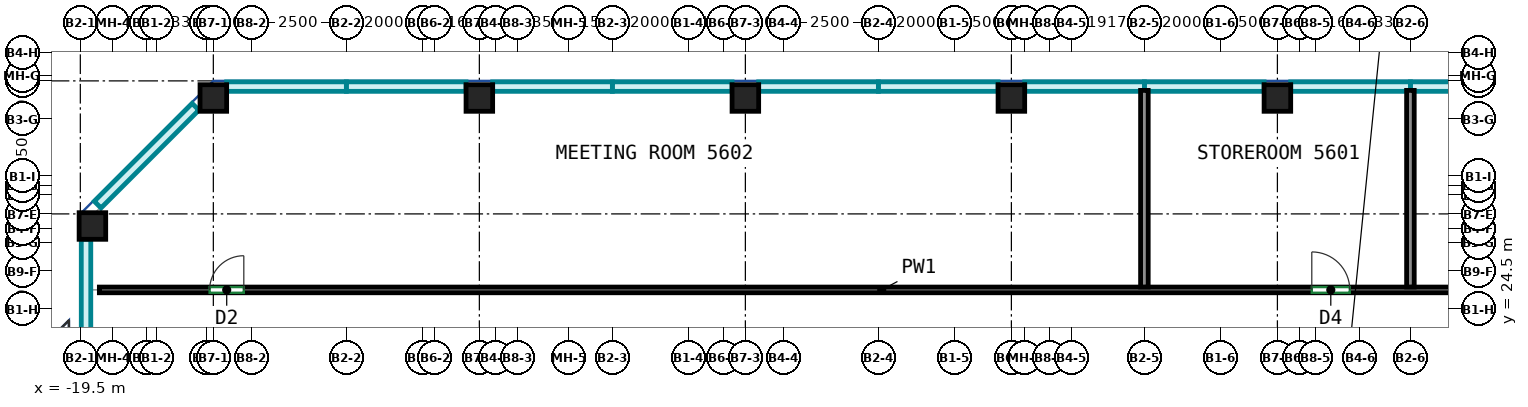
"""IFC4 building model, lengths in metres.
Left out: names, types, materials, properties, quantities, classifications, styles, units other than length and angle.
Written with IfcOpenShell. Run it as: python <this file> out.ifc"""

import sys

from ifc_helpers import new_model, si_unit, direction, frame, frame_2d, origin, origin_2d, place, context, subcontext, project, spatial, rectangle, extrude, source, transform, mapped, element, fill, save


model = new_model("IFC4")
c1 = context("Model", 3, precision=1e-05, world=origin(), true_north=direction((0.0, 1.0)))
c2 = subcontext(c1, "Body", "Model", "MODEL_VIEW")
j1 = project(units=[si_unit("LENGTHUNIT", "METRE"), si_unit("PLANEANGLEUNIT", "RADIAN")], contexts=[c1])
p1 = place(None, origin())
s1 = spatial("IfcSite", under=j1, at=p1, CompositionType="ELEMENT")
p2 = place(p1, origin())
s2 = spatial("IfcBuilding", under=s1, at=p2, CompositionType="ELEMENT")
p3 = place(p2, frame((0.0, 0.0, 233.6)))
s3 = spatial("IfcBuildingStorey", under=s2, at=p3, CompositionType="ELEMENT", Elevation=233.6)
m1 = source(origin(), c2, "Body", "SweptSolid", [
    extrude(rectangle(XDim=0.7, YDim=0.7, at=origin_2d()), origin(), (0.0, 0.0, 1.0), 5.12),
])
for number, where, z_axis, x_axis in (
    (1, (-19.182, 26.682, 0.0), (0.0, 0.0, 1.0), (1.0, 0.0, 0.0)),
    (2, (-16.0, 30.05, 0.0), (0.0, 0.0, 1.0), (1.0, 0.0, 0.0)),
    (3, (-9.0, 30.05, 0.0), (0.0, 0.0, 1.0), (1.0, 0.0, 0.0)),
    (4, (-2.0, 30.05, 0.0), (0.0, 0.0, 1.0), (1.0, 0.0, 0.0)),
    (5, (5.0, 30.05, 0.0), (0.0, 0.0, 1.0), (1.0, 0.0, 0.0)),
    (6, (12.0, 30.05, 0.0), (0.0, 0.0, 1.0), (1.0, 0.0, 0.0)),
):
    element("IfcColumn", number, at=place(p3, frame(where, z_axis=z_axis, x_axis=x_axis)), inside=s3, PredefinedType="COLUMN", context=c2, shape_type="MappedRepresentation", body=[
        mapped(m1, transform((0.0, 0.0, 0.0))),
    ])
p4 = place(p3, frame((-18.999, 25.0, 0.0), z_axis=(0.0, 0.0, 1.0), x_axis=(1.0, 0.0, 0.0)))
e7 = element("IfcWall", 7, at=p4, inside=s3, PredefinedType="PARTITIONING", context=c2, shape_type="SweptSolid", body=[
    extrude(rectangle(XDim=41.174, YDim=0.15, at=frame_2d((20.587, 0.0))), origin(), (0.0, 0.0, 1.0), 5.12),
])
p5 = place(p4, frame((2.901, 0.0, 0.0)))
e8 = element("IfcOpeningElement", 8, at=p5, cuts=e7, PredefinedType="OPENING", context=c2, shape_type="SweptSolid", body=[
    extrude(rectangle(XDim=0.9, YDim=2.1, at=frame_2d((0.45, 1.05))), frame((0.0, 0.085, 0.0), z_axis=(0.0, -1.0, 0.0), x_axis=(1.0, 0.0, 0.0)), (0.0, 0.0, 1.0), 0.17),
])
p6 = place(p4, frame((31.904, 0.0, 0.0)))
e9 = element("IfcOpeningElement", 9, at=p6, cuts=e7, PredefinedType="OPENING", context=c2, shape_type="SweptSolid", body=[
    extrude(rectangle(XDim=1.0, YDim=2.1, at=frame_2d((0.5, 1.05))), frame((0.0, 0.085, 0.0), z_axis=(0.0, -1.0, 0.0), x_axis=(1.0, 0.0, 0.0)), (0.0, 0.0, 1.0), 0.17),
])
for number, where, z_axis, x_axis in (
    (10, (15.5, 30.25, 0.0), (0.0, 0.0, 1.0), (0.0, -1.0, 0.0)),
    (11, (8.5, 25.077, 0.0), (0.0, 0.0, 1.0), (0.0, 1.0, 0.0)),
):
    element("IfcWall", number, at=place(p3, frame(where, z_axis=z_axis, x_axis=x_axis)), inside=s3, PredefinedType="PARTITIONING", context=c2, shape_type="SweptSolid", body=[
        extrude(rectangle(XDim=5.173, YDim=0.2, at=frame_2d((2.586, 0.0))), origin(), (0.0, 0.0, 1.0), 5.12),
    ])
p7 = place(p5, origin())
e12 = element("IfcDoor", 12, at=p7, inside=s3, OperationType="SINGLE_SWING_RIGHT", PredefinedType="DOOR", context=c2, shape_type="SweptSolid", body=[
    extrude(rectangle(XDim=0.9, YDim=2.1, at=frame_2d((0.45, 1.05))), frame((0.0, 0.025, 0.0), z_axis=(0.0, -1.0, 0.0), x_axis=(1.0, 0.0, 0.0)), (0.0, 0.0, 1.0), 0.05),
])
fill(e8, e12)
p8 = place(p6, origin())
e13 = element("IfcDoor", 13, at=p8, inside=s3, OperationType="SINGLE_SWING_LEFT", PredefinedType="DOOR", context=c2, shape_type="SweptSolid", body=[
    extrude(rectangle(XDim=1.0, YDim=2.1, at=frame_2d((0.5, 1.05))), frame((0.0, 0.025, 0.0), z_axis=(0.0, -1.0, 0.0), x_axis=(1.0, 0.0, 0.0)), (0.0, 0.0, 1.0), 0.05),
])
fill(e9, e13)
save(model, sys.argv[1])
